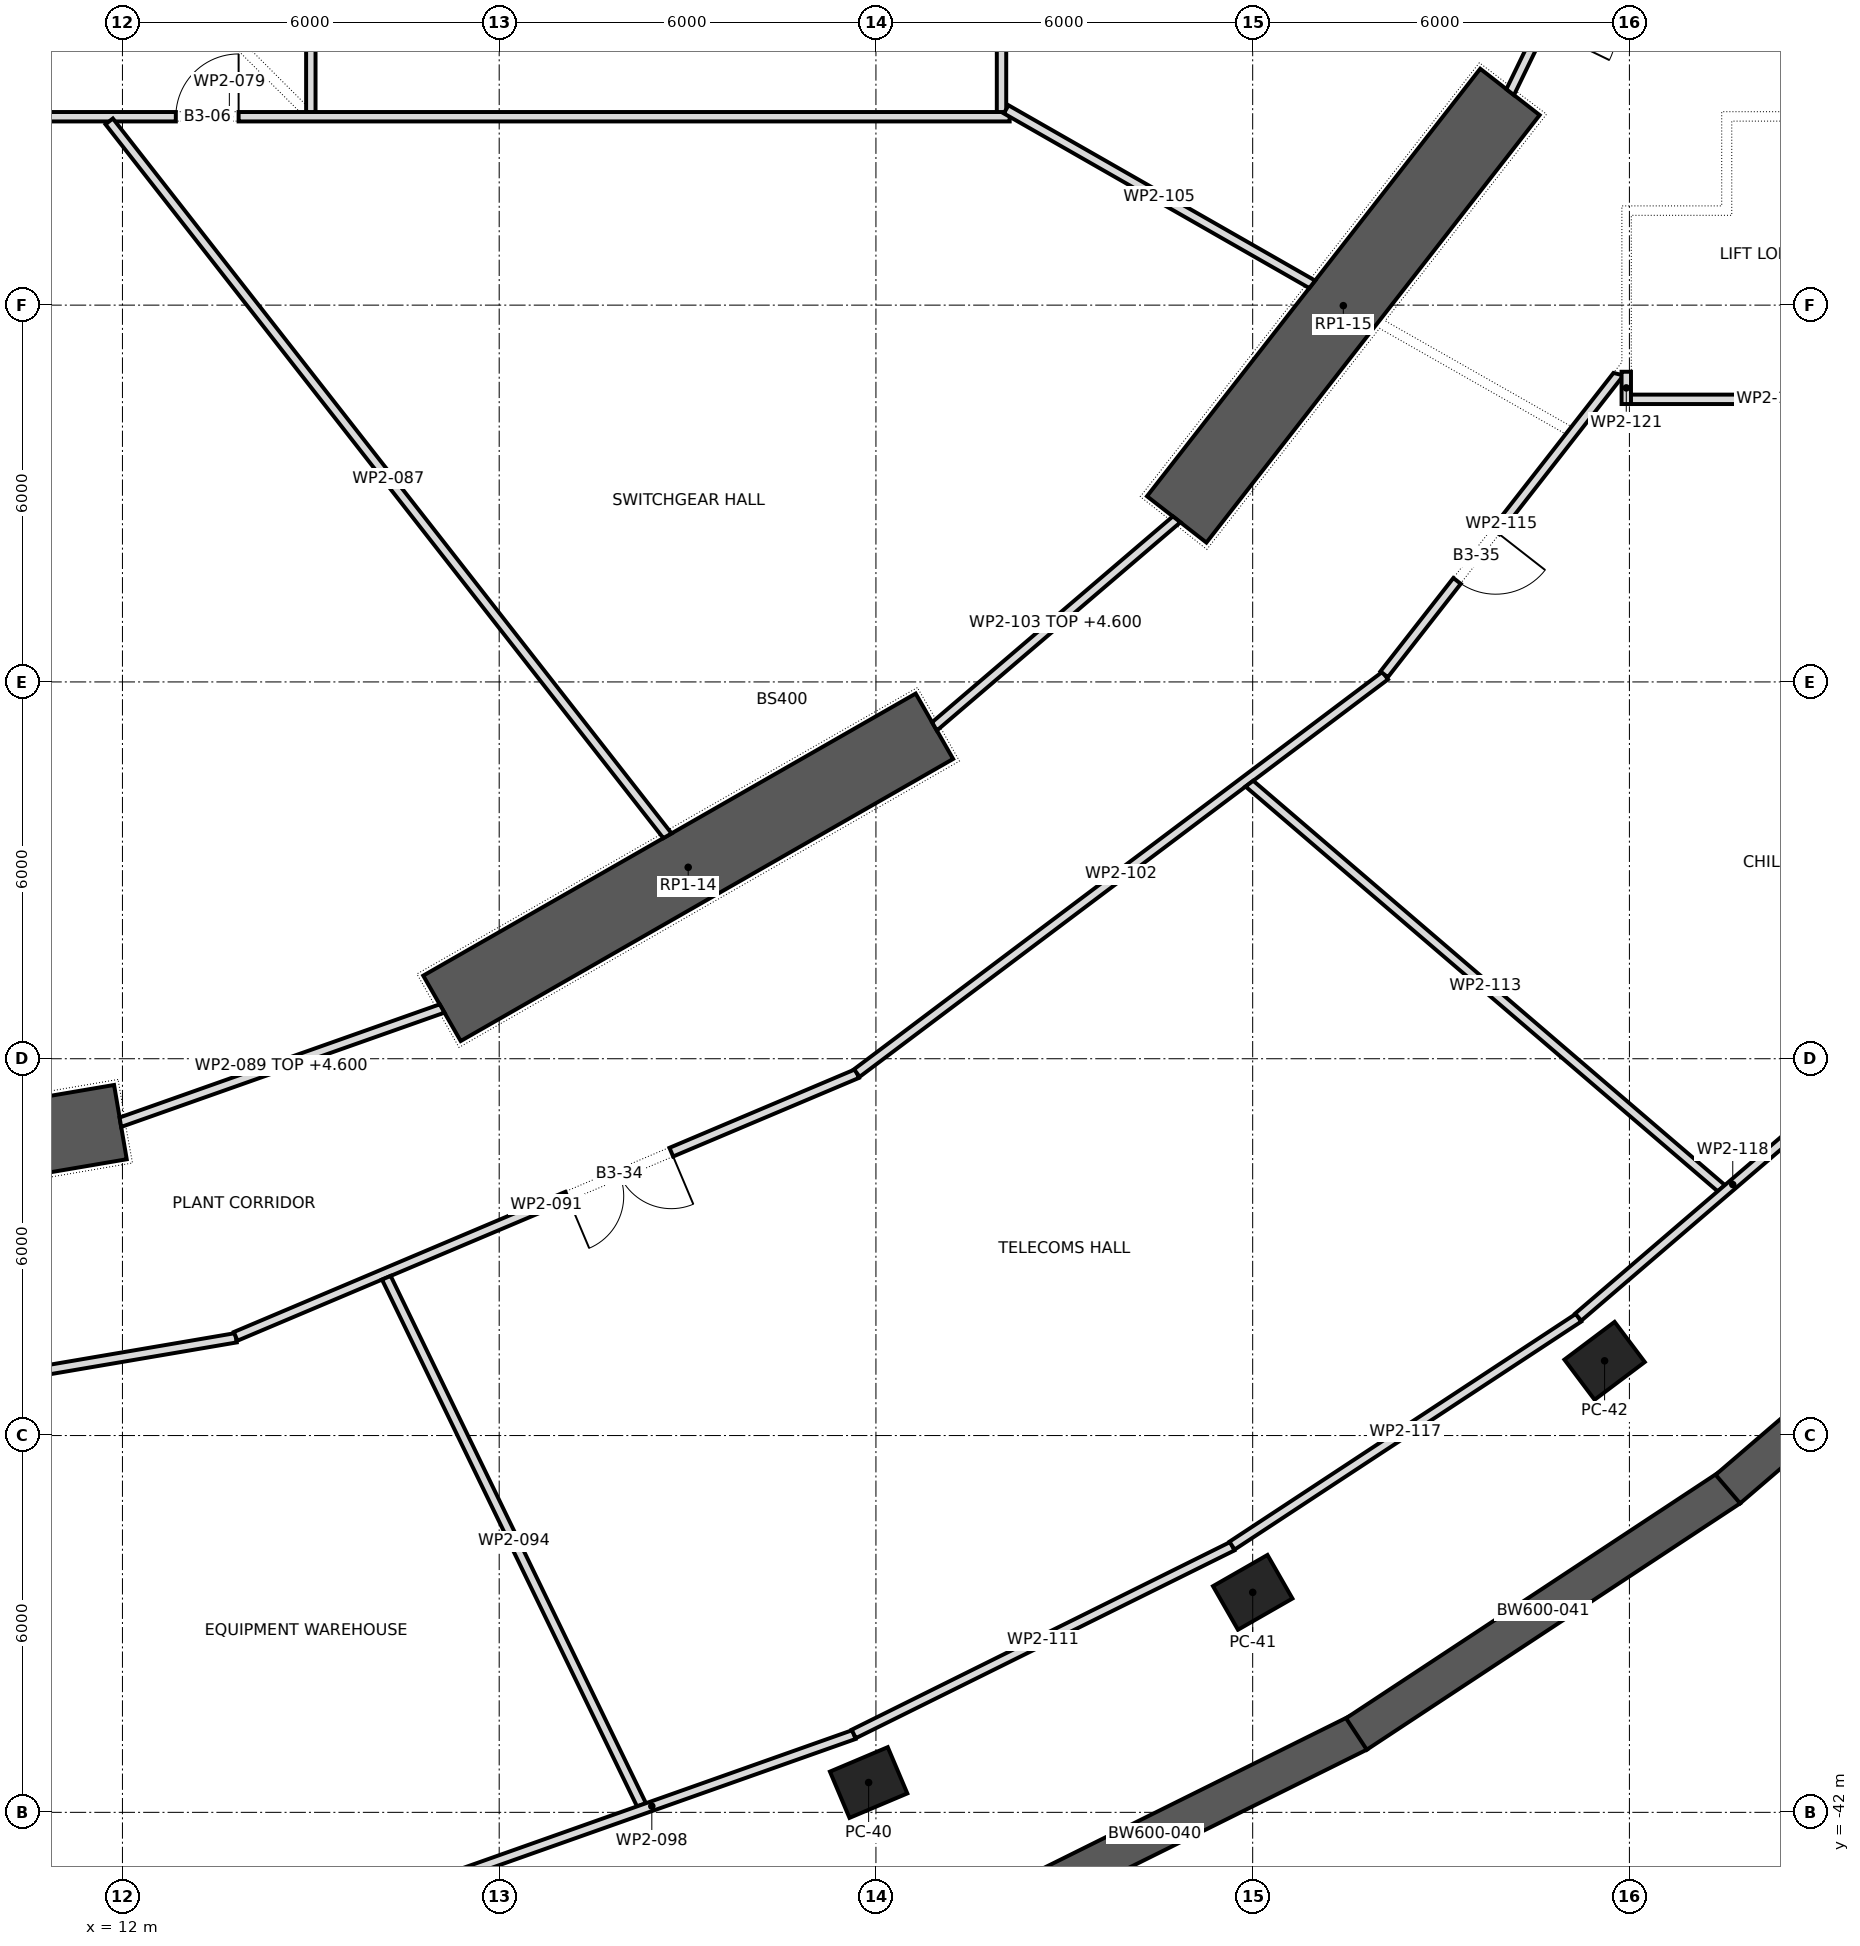
"""IFC4 building model, lengths in metres.
Left out: names, types, materials, properties, quantities, classifications, styles, units other than length and angle.
Written with IfcOpenShell. Run it as: python <this file> out.ifc"""

import sys

from ifc_helpers import new_model, si_unit, direction, frame, frame_2d, origin, origin_2d, place, context, subcontext, project, spatial, polyline, rectangle, outline, extrude, element, fill, save


model = new_model("IFC4")
c1 = context("Model", 3, precision=1e-05, world=origin(), true_north=direction((0.0, 1.0)))
c2 = subcontext(c1, "Body", "Model", "MODEL_VIEW")
j1 = project(units=[si_unit("LENGTHUNIT", "METRE"), si_unit("PLANEANGLEUNIT", "RADIAN")], contexts=[c1])
p1 = place(None, origin())
s1 = spatial("IfcSite", under=j1, at=p1, CompositionType="ELEMENT")
p2 = place(p1, origin())
s2 = spatial("IfcBuilding", under=s1, at=p2, CompositionType="ELEMENT")
p3 = place(p2, frame((0.0, 0.0, -15.0)))
s3 = spatial("IfcBuildingStorey", under=s2, at=p3, CompositionType="ELEMENT", Elevation=-15.0)
for number, where, z_axis, x_axis in (
    (1, (23.884, -41.525, -0.4), (0.0, 0.0, 1.0), (0.921, 0.389, 0.0)),
    (2, (30.001, -38.497, -0.4), (0.0, 0.0, 1.0), (0.868, 0.497, 0.0)),
    (3, (35.605, -34.81, -0.4), (0.0, 0.0, 1.0), (0.799, 0.601, 0.0)),
):
    element("IfcColumn", number, at=place(p3, frame(where, z_axis=z_axis, x_axis=x_axis)), inside=s3, PredefinedType="COLUMN", context=c2, shape_type="SweptSolid", body=[
        extrude(rectangle(XDim=1.0, YDim=0.8, at=origin_2d()), origin(), (0.0, 0.0, 1.0), 5.9),
    ])
p4 = place(p3, frame((2.788, -32.574, -0.4), z_axis=(0.0, 0.0, 1.0), x_axis=(0.985776286846, 0.168062822456, 0.0)))
e4 = element("IfcWall", 4, at=p4, inside=s3, PredefinedType="SHEAR", context=c2, shape_type="SweptSolid", body=[
    extrude(rectangle(XDim=9.312, YDim=1.2, at=frame_2d((4.656, 0.0))), origin(), (0.0, 0.0, 1.0), 5.9),
])
p5 = place(p3, frame((17.089, -29.198, -0.4), z_axis=(0.0, 0.0, 1.0), x_axis=(0.867760656864, 0.496982336103, 0.0)))
e5 = element("IfcWall", 5, at=p5, inside=s3, PredefinedType="SHEAR", context=c2, shape_type="SweptSolid", body=[
    extrude(rectangle(XDim=9.038, YDim=1.2, at=frame_2d((4.519, 0.0))), origin(), (0.0, 0.0, 1.0), 5.9),
])
p6 = place(p3, frame((28.79, -21.412, -0.4), z_axis=(0.0, 0.0, 1.0), x_axis=(0.614825322247, 0.788663314174, 0.0)))
e6 = element("IfcWall", 6, at=p6, inside=s3, PredefinedType="SHEAR", context=c2, shape_type="SweptSolid", body=[
    extrude(rectangle(XDim=8.632, YDim=1.2, at=frame_2d((4.316, 0.0))), origin(), (0.0, 0.0, 1.0), 5.9),
])
p7 = place(p3, frame((25.195, -43.955, -0.4), z_axis=(0.0, 0.0, 1.0), x_axis=(0.895750986496, 0.44455614965, 0.0)))
e7 = element("IfcWall", 7, at=p7, inside=s3, PredefinedType="SOLIDWALL", context=c2, shape_type="SweptSolid", body=[
    extrude(rectangle(XDim=7.245, YDim=0.6, at=frame_2d((3.623, 0.0))), origin(), (0.0, 0.0, 1.0), 5.9),
])
p8 = place(p3, frame((31.652, -40.752, -0.4), z_axis=(0.0, 0.0, 1.0), x_axis=(0.834745196239, 0.550636411215, 0.0)))
e8 = element("IfcWall", 8, at=p8, inside=s3, PredefinedType="SOLIDWALL", context=c2, shape_type="SweptSolid", body=[
    extrude(rectangle(XDim=7.124, YDim=0.6, at=frame_2d((3.562, 0.0))), origin(), (0.0, 0.0, 1.0), 5.9),
])
p9 = place(p3, frame((37.568, -36.853, -0.4), z_axis=(0.0, 0.0, 1.0), x_axis=(0.758319142722, 0.65188348482, 0.0)))
e9 = element("IfcWall", 9, at=p9, inside=s3, PredefinedType="SOLIDWALL", context=c2, shape_type="SweptSolid", body=[
    extrude(rectangle(XDim=6.991, YDim=0.6, at=frame_2d((3.496, 0.0))), origin(), (0.0, 0.0, 1.0), 5.9),
])
p10 = place(p3, frame((1.275, -15.0, 0.0), z_axis=(0.0, 0.0, 1.0), x_axis=(1.0, 0.0, 0.0)))
e10 = element("IfcWall", 10, at=p10, inside=s3, PredefinedType="PARTITIONING", context=c2, shape_type="SweptSolid", body=[
    extrude(rectangle(XDim=24.855, YDim=0.15, at=frame_2d((12.427, 0.0))), origin(), (0.0, 0.0, 1.0), 5.15),
])
p11 = place(p10, frame((4.294, 0.0, 0.0)))
e11 = element("IfcOpeningElement", 11, at=p11, cuts=e10, PredefinedType="OPENING", context=c2, shape_type="SweptSolid", body=[
    extrude(rectangle(XDim=1.8, YDim=2.1, at=frame_2d((0.9, 1.05))), frame((0.0, 0.087, 0.0), z_axis=(0.0, -1.0, 0.0), x_axis=(1.0, 0.0, 0.0)), (0.0, 0.0, 1.0), 0.174),
])
p12 = place(p10, frame((11.575, 0.0, 0.0)))
e12 = element("IfcOpeningElement", 12, at=p12, cuts=e10, PredefinedType="OPENING", context=c2, shape_type="SweptSolid", body=[
    extrude(rectangle(XDim=1.0, YDim=2.1, at=frame_2d((0.5, 1.05))), frame((0.0, 0.087, 0.0), z_axis=(0.0, -1.0, 0.0), x_axis=(1.0, 0.0, 0.0)), (0.0, 0.0, 1.0), 0.174),
])
p13 = place(p3, frame((11.788, -15.074, 0.0), z_axis=(0.0, 0.0, 1.0), x_axis=(0.615848120598, -0.787864894735, 0.0)))
e13 = element("IfcWall", 13, at=p13, inside=s3, PredefinedType="PARTITIONING", context=c2, shape_type="SweptSolid", body=[
    extrude(outline(polyline([(0.0, -0.075), (14.428, -0.075), (14.449, 0.075), (0.0, 0.075), (0.0, -0.075)])), origin(), (0.0, 0.0, 1.0), 5.15),
])
p14 = place(p3, frame((11.967, -31.011, 0.0), z_axis=(0.0, 0.0, 1.0), x_axis=(0.942814385805, 0.333318217204, 0.0)))
e14 = element("IfcWall", 14, at=p14, inside=s3, PredefinedType="PARTITIONING", context=c2, shape_type="SweptSolid", body=[
    extrude(outline(polyline([(-0.013, -0.075), (5.448, -0.075), (5.421, 0.075), (0.013, 0.075), (-0.013, -0.075)])), origin(), (0.0, 0.0, 1.0), 4.6),
])
p15 = place(p3, frame((13.807, -34.444, 0.0), z_axis=(0.0, 0.0, 1.0), x_axis=(-0.985802701022, -0.167907815955, 0.0)))
e15 = element("IfcWall", 15, at=p15, inside=s3, PredefinedType="PARTITIONING", context=c2, shape_type="SweptSolid", body=[
    extrude(rectangle(XDim=11.077, YDim=0.15, at=frame_2d((5.538, 0.0))), origin(), (0.0, 0.0, 1.0), 5.15),
])
p16 = place(p15, frame((4.737, 0.0, 0.0)))
e16 = element("IfcOpeningElement", 16, at=p16, cuts=e15, PredefinedType="OPENING", context=c2, shape_type="SweptSolid", body=[
    extrude(rectangle(XDim=1.8, YDim=2.1, at=frame_2d((0.9, 1.05))), frame((0.0, 0.087, 0.0), z_axis=(0.0, -1.0, 0.0), x_axis=(1.0, 0.0, 0.0)), (0.0, 0.0, 1.0), 0.174),
])
p17 = place(p3, frame((13.802, -34.421, 0.0), z_axis=(0.0, 0.0, 1.0), x_axis=(0.921072890143, 0.389390204094, 0.0)))
e17 = element("IfcWall", 17, at=p17, inside=s3, PredefinedType="PARTITIONING", context=c2, shape_type="SweptSolid", body=[
    extrude(rectangle(XDim=10.746, YDim=0.15, at=frame_2d((5.373, 0.0))), origin(), (0.0, 0.0, 1.0), 5.15),
])
p18 = place(p17, frame((5.733, 0.0, 0.0)))
e18 = element("IfcOpeningElement", 18, at=p18, cuts=e17, PredefinedType="OPENING", context=c2, shape_type="SweptSolid", body=[
    extrude(rectangle(XDim=1.8, YDim=2.1, at=frame_2d((0.9, 1.05))), frame((0.0, 0.087, 0.0), z_axis=(0.0, -1.0, 0.0), x_axis=(1.0, 0.0, 0.0)), (0.0, 0.0, 1.0), 0.174),
])
p19 = place(p3, frame((15.0, -14.925, 0.0), z_axis=(0.0, 0.0, 1.0), x_axis=(0.0, 1.0, 0.0)))
e19 = element("IfcWall", 19, at=p19, inside=s3, PredefinedType="PARTITIONING", context=c2, shape_type="SweptSolid", body=[
    extrude(rectangle(XDim=29.85, YDim=0.15, at=frame_2d((14.925, 0.0))), origin(), (0.0, 0.0, 1.0), 5.15),
])
p20 = place(p19, frame((25.66, 0.0, 0.0)))
e20 = element("IfcOpeningElement", 20, at=p20, cuts=e19, PredefinedType="OPENING", context=c2, shape_type="SweptSolid", body=[
    extrude(rectangle(XDim=1.0, YDim=2.1, at=frame_2d((0.5, 1.05))), frame((0.0, 0.087, 0.0), z_axis=(0.0, -1.0, 0.0), x_axis=(1.0, 0.0, 0.0)), (0.0, 0.0, 1.0), 0.174),
])
p21 = place(p19, frame((3.19, 0.0, 0.0)))
e21 = element("IfcOpeningElement", 21, at=p21, cuts=e19, PredefinedType="OPENING", context=c2, shape_type="SweptSolid", body=[
    extrude(rectangle(XDim=1.0, YDim=2.1, at=frame_2d((0.5, 1.05))), frame((0.0, 0.087, 0.0), z_axis=(0.0, -1.0, 0.0), x_axis=(1.0, 0.0, 0.0)), (0.0, 0.0, 1.0), 0.174),
])
p22 = place(p19, frame((13.725, 0.0, 0.0)))
e22 = element("IfcOpeningElement", 22, at=p22, cuts=e19, PredefinedType="OPENING", context=c2, shape_type="SweptSolid", body=[
    extrude(rectangle(XDim=2.4, YDim=2.1, at=frame_2d((1.2, 1.05))), frame((0.0, 0.087, 0.0), z_axis=(0.0, -1.0, 0.0), x_axis=(1.0, 0.0, 0.0)), (0.0, 0.0, 1.0), 0.174),
])
p23 = place(p3, frame((16.202, -33.487, 0.0), z_axis=(0.0, 0.0, 1.0), x_axis=(0.435783992342, -0.900051282994, 0.0)))
e23 = element("IfcWall", 23, at=p23, inside=s3, PredefinedType="PARTITIONING", context=c2, shape_type="SweptSolid", body=[
    extrude(outline(polyline([(-0.004, -0.075), (9.317, -0.075), (9.334, 0.075), (0.004, 0.075), (-0.004, -0.075)])), origin(), (0.0, 0.0, 1.0), 5.15),
])
p24 = place(p3, frame((17.211, -43.042, 0.0), z_axis=(0.0, 0.0, 1.0), x_axis=(0.94266330093, 0.333745263757, 0.0)))
e24 = element("IfcWall", 24, at=p24, inside=s3, PredefinedType="PARTITIONING", context=c2, shape_type="SweptSolid", body=[
    extrude(rectangle(XDim=6.832, YDim=0.15, at=frame_2d((3.416, 0.0))), origin(), (0.0, 0.0, 1.0), 5.15),
])
p25 = place(p3, frame((23.696, -30.228, 0.0), z_axis=(0.0, 0.0, 1.0), x_axis=(0.799195100787, 0.601071701944, 0.0)))
e25 = element("IfcWall", 25, at=p25, inside=s3, PredefinedType="PARTITIONING", context=c2, shape_type="SweptSolid", body=[
    extrude(rectangle(XDim=10.529, YDim=0.15, at=frame_2d((5.264, 0.0))), origin(), (0.0, 0.0, 1.0), 5.15),
])
p26 = place(p3, frame((24.932, -24.708, 0.0), z_axis=(0.0, 0.0, 1.0), x_axis=(0.760084552743, 0.649824185978, 0.0)))
e26 = element("IfcWall", 26, at=p26, inside=s3, PredefinedType="PARTITIONING", context=c2, shape_type="SweptSolid", body=[
    extrude(outline(polyline([(-0.014, -0.075), (5.09, -0.075), (5.06, 0.075), (0.014, 0.075), (-0.014, -0.075)])), origin(), (0.0, 0.0, 1.0), 4.6),
])
p27 = place(p3, frame((26.0, -14.925, 0.0), z_axis=(0.0, 0.0, 1.0), x_axis=(0.0, 1.0, 0.0)))
e27 = element("IfcWall", 27, at=p27, inside=s3, PredefinedType="PARTITIONING", context=c2, shape_type="SweptSolid", body=[
    extrude(rectangle(XDim=7.351, YDim=0.15, at=frame_2d((3.676, 0.0))), origin(), (0.0, 0.0, 1.0), 5.15),
])
p28 = place(p3, frame((26.074, -14.882, 0.0), z_axis=(0.0, 0.0, 1.0), x_axis=(0.868133416031, -0.496330909746, 0.0)))
e28 = element("IfcWall", 28, at=p28, inside=s3, PredefinedType="PARTITIONING", context=c2, shape_type="SweptSolid", body=[
    extrude(outline(polyline([(0.0, -0.075), (5.604, -0.075), (5.626, 0.075), (0.0, 0.075), (0.0, -0.075)])), origin(), (0.0, 0.0, 1.0), 5.15),
])
p29 = place(p3, frame((29.677, -37.762, 0.0), z_axis=(0.0, 0.0, 1.0), x_axis=(-0.895909442692, -0.444236727991, 0.0)))
e29 = element("IfcWall", 29, at=p29, inside=s3, PredefinedType="PARTITIONING", context=c2, shape_type="SweptSolid", body=[
    extrude(rectangle(XDim=6.731, YDim=0.15, at=frame_2d((3.365, 0.0))), origin(), (0.0, 0.0, 1.0), 5.15),
])
p30 = place(p3, frame((29.947, -25.619, 0.0), z_axis=(0.0, 0.0, 1.0), x_axis=(0.759265306208, -0.650781218836, 0.0)))
e30 = element("IfcWall", 30, at=p30, inside=s3, PredefinedType="PARTITIONING", context=c2, shape_type="SweptSolid", body=[
    extrude(outline(polyline([(-0.017, -0.075), (9.888, -0.075), (9.911, 0.075), (0.017, 0.075), (-0.017, -0.075)])), origin(), (0.0, 0.0, 1.0), 5.15),
])
p31 = place(p3, frame((32.094, -23.878, 0.0), z_axis=(0.0, 0.0, 1.0), x_axis=(0.615450256232, 0.788175730472, 0.0)))
e31 = element("IfcWall", 31, at=p31, inside=s3, PredefinedType="PARTITIONING", context=c2, shape_type="SweptSolid", body=[
    extrude(outline(polyline([(0.0, -0.075), (6.097, -0.075), (6.03, 0.075), (0.0, 0.075), (0.0, -0.075)])), origin(), (0.0, 0.0, 1.0), 5.15),
])
p32 = place(p31, frame((1.887, 0.0, 0.0)))
e32 = element("IfcOpeningElement", 32, at=p32, cuts=e31, PredefinedType="OPENING", context=c2, shape_type="SweptSolid", body=[
    extrude(rectangle(XDim=1.0, YDim=2.1, at=frame_2d((0.5, 1.05))), frame((0.0, 0.087, 0.0), z_axis=(0.0, -1.0, 0.0), x_axis=(1.0, 0.0, 0.0)), (0.0, 0.0, 1.0), 0.174),
])
p33 = place(p3, frame((35.191, -34.123, 0.0), z_axis=(0.0, 0.0, 1.0), x_axis=(-0.83553583791, -0.549435950378, 0.0)))
e33 = element("IfcWall", 33, at=p33, inside=s3, PredefinedType="PARTITIONING", context=c2, shape_type="SweptSolid", body=[
    extrude(rectangle(XDim=6.606, YDim=0.15, at=frame_2d((3.303, 0.0))), origin(), (0.0, 0.0, 1.0), 5.15),
])
p34 = place(p3, frame((35.185, -34.114, 0.0), z_axis=(0.0, 0.0, 1.0), x_axis=(0.759033312601, 0.651051787773, 0.0)))
e34 = element("IfcWall", 34, at=p34, inside=s3, PredefinedType="PARTITIONING", context=c2, shape_type="SweptSolid", body=[
    extrude(rectangle(XDim=6.484, YDim=0.15, at=frame_2d((3.242, 0.0))), origin(), (0.0, 0.0, 1.0), 5.15),
])
p35 = place(p3, frame((35.95, -19.575, 0.0), z_axis=(0.0, 0.0, 1.0), x_axis=(0.0, 1.0, 0.0)))
e35 = element("IfcWall", 35, at=p35, inside=s3, PredefinedType="PARTITIONING", context=c2, shape_type="SweptSolid", body=[
    extrude(rectangle(XDim=0.514, YDim=0.15, at=frame_2d((0.257, 0.0))), origin(), (0.0, 0.0, 1.0), 5.15),
])
p36 = place(p3, frame((36.15, -10.38, 0.0), z_axis=(0.0, 0.0, 1.0), x_axis=(-0.436102687495, -0.899896908518, 0.0)))
e36 = element("IfcWall", 36, at=p36, inside=s3, PredefinedType="PARTITIONING", context=c2, shape_type="SweptSolid", body=[
    extrude(outline(polyline([(0.017, -0.075), (4.683, -0.075), (4.715, 0.075), (-0.017, 0.075), (0.017, -0.075)])), origin(), (0.0, 0.0, 1.0), 4.6),
])
p37 = place(p36, frame((1.15, 0.0, 0.0)))
e37 = element("IfcOpeningElement", 37, at=p37, cuts=e36, PredefinedType="OPENING", context=c2, shape_type="SweptSolid", body=[
    extrude(rectangle(XDim=2.4, YDim=2.1, at=frame_2d((1.2, 1.05))), frame((0.0, 0.087, 0.0), z_axis=(0.0, -1.0, 0.0), x_axis=(1.0, 0.0, 0.0)), (0.0, 0.0, 1.0), 0.174),
])
p38 = place(p3, frame((40.525, -19.5, 0.0), z_axis=(0.0, 0.0, 1.0), x_axis=(-1.0, 0.0, 0.0)))
e38 = element("IfcWall", 38, at=p38, inside=s3, PredefinedType="PARTITIONING", context=c2, shape_type="SweptSolid", body=[
    extrude(rectangle(XDim=4.5, YDim=0.15, at=frame_2d((2.25, 0.0))), origin(), (0.0, 0.0, 1.0), 5.15),
])
p39 = place(p12, origin())
e39 = element("IfcDoor", 39, at=p39, inside=s3, OperationType="SINGLE_SWING_LEFT", PredefinedType="DOOR", context=c2, shape_type="SweptSolid", body=[
    extrude(rectangle(XDim=1.0, YDim=2.1, at=frame_2d((0.5, 1.05))), frame((0.0, 0.025, 0.0), z_axis=(0.0, -1.0, 0.0), x_axis=(1.0, 0.0, 0.0)), (0.0, 0.0, 1.0), 0.05),
])
fill(e12, e39)
p40 = place(p18, frame((1.8, 0.0, 0.0), z_axis=(0.0, 0.0, 1.0), x_axis=(-1.0, 0.0, 0.0)))
e40 = element("IfcDoor", 40, at=p40, inside=s3, OperationType="DOUBLE_DOOR_SINGLE_SWING", PredefinedType="DOOR", context=c2, shape_type="SweptSolid", body=[
    extrude(rectangle(XDim=1.8, YDim=2.1, at=frame_2d((0.9, 1.05))), frame((0.0, 0.025, 0.0), z_axis=(0.0, -1.0, 0.0), x_axis=(1.0, 0.0, 0.0)), (0.0, 0.0, 1.0), 0.05),
])
fill(e18, e40)
p41 = place(p32, frame((1.0, 0.0, 0.0), z_axis=(0.0, 0.0, 1.0), x_axis=(-1.0, 0.0, 0.0)))
e41 = element("IfcDoor", 41, at=p41, inside=s3, OperationType="SINGLE_SWING_RIGHT", PredefinedType="DOOR", context=c2, shape_type="SweptSolid", body=[
    extrude(rectangle(XDim=1.0, YDim=2.1, at=frame_2d((0.5, 1.05))), frame((0.0, 0.025, 0.0), z_axis=(0.0, -1.0, 0.0), x_axis=(1.0, 0.0, 0.0)), (0.0, 0.0, 1.0), 0.05),
])
fill(e32, e41)
save(model, sys.argv[1])
